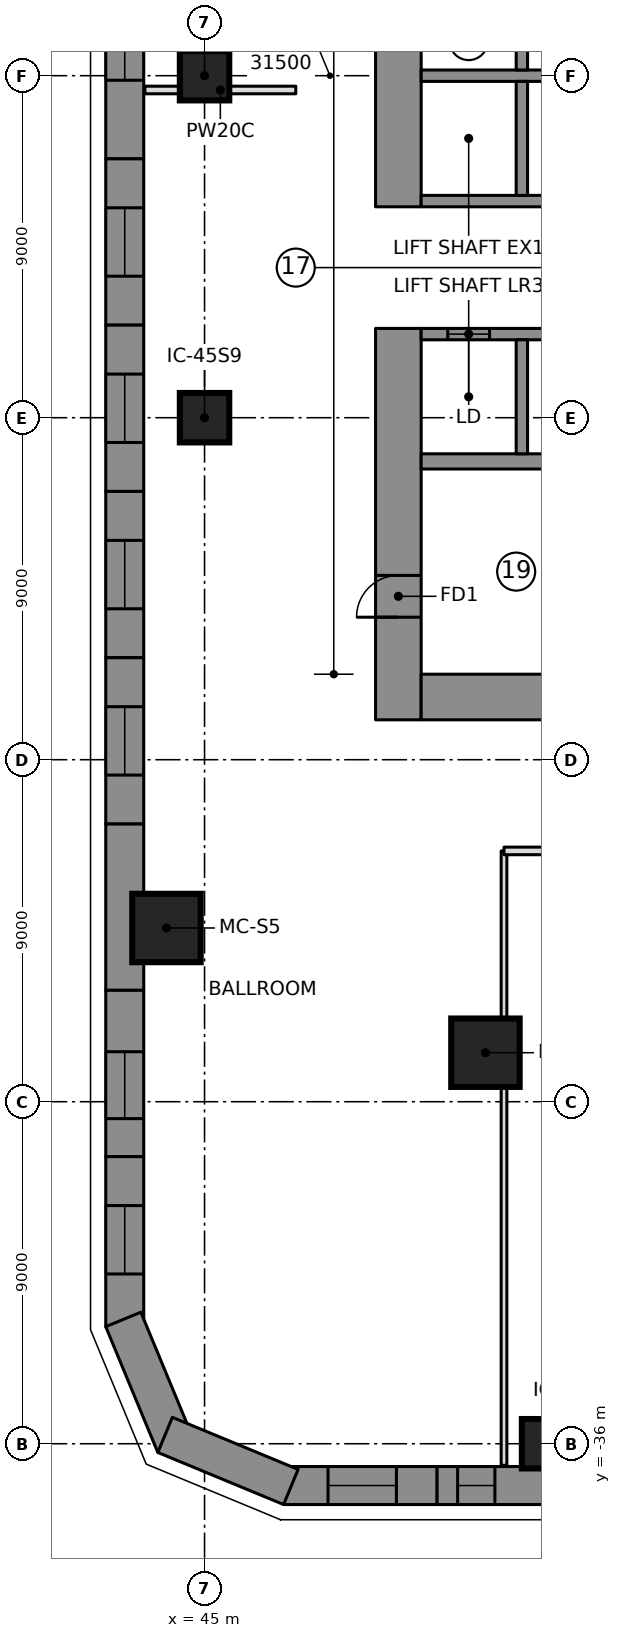
"""IFC4 building model, lengths in metres.
Left out: names, types, materials, properties, quantities, classifications, styles, units other than length and angle.
Written with IfcOpenShell. Run it as: python <this file> out.ifc"""

import sys

from ifc_helpers import new_model, si_unit, direction, frame, frame_2d, origin, origin_2d, place, context, subcontext, project, spatial, polyline, rectangle, outline, extrude, element, fill, save


model = new_model("IFC4")
c1 = context("Model", 3, precision=1e-05, world=origin(), true_north=direction((0.0, 1.0)))
c2 = subcontext(c1, "Body", "Model", "MODEL_VIEW")
j1 = project(units=[si_unit("LENGTHUNIT", "METRE"), si_unit("PLANEANGLEUNIT", "RADIAN")], contexts=[c1])
p1 = place(None, origin())
s1 = spatial("IfcSite", under=j1, at=p1, CompositionType="ELEMENT")
p2 = place(p1, origin())
s2 = spatial("IfcBuilding", under=s1, at=p2, CompositionType="ELEMENT")
p3 = place(p2, frame((0.0, 0.0, 8.0)))
s3 = spatial("IfcBuildingStorey", under=s2, at=p3, CompositionType="ELEMENT", Elevation=8.0)
p4 = place(p3, frame((50.1, -3.45, 0.0), z_axis=(0.0, 0.0, 1.0), x_axis=(0.0, 1.0, 0.0)))
e1 = element("IfcWall", 1, at=p4, inside=s3, PredefinedType="SHEAR", context=c2, shape_type="SweptSolid", body=[
    extrude(rectangle(XDim=6.9, YDim=1.2, at=frame_2d((3.45, 0.0))), origin(), (0.0, 0.0, 1.0), 5.5),
])
p5 = place(p3, frame((50.1, -16.95, 0.0), z_axis=(0.0, 0.0, 1.0), x_axis=(0.0, 1.0, 0.0)))
e2 = element("IfcWall", 2, at=p5, inside=s3, PredefinedType="SHEAR", context=c2, shape_type="SweptSolid", body=[
    extrude(rectangle(XDim=10.3, YDim=1.2, at=frame_2d((5.15, 0.0))), origin(), (0.0, 0.0, 1.0), 5.5),
])
p6 = place(p5, frame((2.7, 0.0, 0.0)))
e3 = element("IfcOpeningElement", 3, at=p6, cuts=e2, PredefinedType="OPENING", context=c2, shape_type="SweptSolid", body=[
    extrude(rectangle(XDim=1.1, YDim=2.1, at=frame_2d((0.55, 1.05))), frame((0.0, 0.61, 0.0), z_axis=(0.0, -1.0, 0.0), x_axis=(1.0, 0.0, 0.0)), (0.0, 0.0, 1.0), 1.22),
])
p7 = place(p3, frame((50.7, -16.35, 0.0), z_axis=(0.0, 0.0, 1.0), x_axis=(1.0, 0.0, 0.0)))
e4 = element("IfcWall", 4, at=p7, inside=s3, PredefinedType="SHEAR", context=c2, shape_type="SweptSolid", body=[
    extrude(rectangle(XDim=13.38, YDim=1.2, at=frame_2d((6.69, 0.0))), origin(), (0.0, 0.0, 1.0), 5.5),
])
p8 = place(p3, frame((50.7, -10.15, 0.0), z_axis=(0.0, 0.0, 1.0), x_axis=(1.0, 0.0, 0.0)))
e5 = element("IfcWall", 5, at=p8, inside=s3, PredefinedType="SHEAR", context=c2, shape_type="SweptSolid", body=[
    extrude(rectangle(XDim=12.18, YDim=0.4, at=frame_2d((6.09, 0.0))), origin(), (0.0, 0.0, 1.0), 5.5),
])
p9 = place(p3, frame((50.7, 0.0, 0.0), z_axis=(0.0, 0.0, 1.0), x_axis=(1.0, 0.0, 0.0)))
e6 = element("IfcWall", 6, at=p9, inside=s3, PredefinedType="SHEAR", context=c2, shape_type="SweptSolid", body=[
    extrude(rectangle(XDim=10.9, YDim=0.3, at=frame_2d((5.45, 0.0))), origin(), (0.0, 0.0, 1.0), 5.5),
])
p10 = place(p3, frame((53.35, 0.15, 0.0), z_axis=(0.0, 0.0, 1.0), x_axis=(0.0, 1.0, 0.0)))
e7 = element("IfcWall", 7, at=p10, inside=s3, PredefinedType="SHEAR", context=c2, shape_type="SweptSolid", body=[
    extrude(rectangle(XDim=3.0, YDim=0.3, at=frame_2d((1.5, 0.0))), origin(), (0.0, 0.0, 1.0), 5.5),
])
p11 = place(p3, frame((50.7, -3.3, 0.0), z_axis=(0.0, 0.0, 1.0), x_axis=(1.0, 0.0, 0.0)))
e8 = element("IfcWall", 8, at=p11, inside=s3, PredefinedType="SHEAR", context=c2, shape_type="SweptSolid", body=[
    extrude(rectangle(XDim=10.9, YDim=0.3, at=frame_2d((5.45, 0.0))), origin(), (0.0, 0.0, 1.0), 5.5),
])
p12 = place(p11, frame((9.2, 0.0, 0.0)))
e9 = element("IfcOpeningElement", 9, at=p12, cuts=e8, PredefinedType="OPENING", context=c2, shape_type="SweptSolid", body=[
    extrude(rectangle(XDim=0.9, YDim=2.1, at=frame_2d((0.45, 1.05))), frame((0.0, 0.16, 0.0), z_axis=(0.0, -1.0, 0.0), x_axis=(1.0, 0.0, 0.0)), (0.0, 0.0, 1.0), 0.32),
])
p13 = place(p3, frame((50.7, -6.8, 0.0), z_axis=(0.0, 0.0, 1.0), x_axis=(1.0, 0.0, 0.0)))
e10 = element("IfcWall", 10, at=p13, inside=s3, PredefinedType="SHEAR", context=c2, shape_type="SweptSolid", body=[
    extrude(rectangle(XDim=10.9, YDim=0.3, at=frame_2d((5.45, 0.0))), origin(), (0.0, 0.0, 1.0), 5.5),
])
p14 = place(p13, frame((0.7, 0.0, 0.0)))
e11 = element("IfcOpeningElement", 11, at=p14, cuts=e10, PredefinedType="OPENING", context=c2, shape_type="SweptSolid", body=[
    extrude(rectangle(XDim=1.1, YDim=2.1, at=frame_2d((0.55, 1.05))), frame((0.0, 0.16, 0.0), z_axis=(0.0, -1.0, 0.0), x_axis=(1.0, 0.0, 0.0)), (0.0, 0.0, 1.0), 0.32),
])
p15 = place(p13, frame((3.5, 0.0, 0.0)))
e12 = element("IfcOpeningElement", 12, at=p15, cuts=e10, PredefinedType="OPENING", context=c2, shape_type="SweptSolid", body=[
    extrude(rectangle(XDim=1.1, YDim=2.1, at=frame_2d((0.55, 1.05))), frame((0.0, 0.16, 0.0), z_axis=(0.0, -1.0, 0.0), x_axis=(1.0, 0.0, 0.0)), (0.0, 0.0, 1.0), 0.32),
])
p16 = place(p13, frame((6.3, 0.0, 0.0)))
e13 = element("IfcOpeningElement", 13, at=p16, cuts=e10, PredefinedType="OPENING", context=c2, shape_type="SweptSolid", body=[
    extrude(rectangle(XDim=1.1, YDim=2.1, at=frame_2d((0.55, 1.05))), frame((0.0, 0.16, 0.0), z_axis=(0.0, -1.0, 0.0), x_axis=(1.0, 0.0, 0.0)), (0.0, 0.0, 1.0), 0.32),
])
p17 = place(p13, frame((9.1, 0.0, 0.0)))
e14 = element("IfcOpeningElement", 14, at=p17, cuts=e10, PredefinedType="OPENING", context=c2, shape_type="SweptSolid", body=[
    extrude(rectangle(XDim=1.1, YDim=2.1, at=frame_2d((0.55, 1.05))), frame((0.0, 0.16, 0.0), z_axis=(0.0, -1.0, 0.0), x_axis=(1.0, 0.0, 0.0)), (0.0, 0.0, 1.0), 0.32),
])
for number, where, z_axis, x_axis in (
    (15, (53.35, -3.15, 0.0), (0.0, 0.0, 1.0), (0.0, 1.0, 0.0)),
    (16, (53.35, -9.95, 0.0), (0.0, 0.0, 1.0), (0.0, 1.0, 0.0)),
):
    element("IfcWall", number, at=place(p3, frame(where, z_axis=z_axis, x_axis=x_axis)), inside=s3, PredefinedType="SHEAR", context=c2, shape_type="SweptSolid", body=[
        extrude(rectangle(XDim=3.0, YDim=0.3, at=frame_2d((1.5, 0.0))), origin(), (0.0, 0.0, 1.0), 5.5),
    ])
for number, where, z_axis, x_axis in (
    (17, (43.998, -22.428, 0.0), (0.0, 0.0, 1.0), (1.0, 0.0, 0.0)),
    (18, (52.392, -25.71, 0.0), (0.0, 0.0, 1.0), (1.0, 0.0, 0.0)),
):
    element("IfcColumn", number, at=place(p3, frame(where, z_axis=z_axis, x_axis=x_axis)), inside=s3, PredefinedType="COLUMN", context=c2, shape_type="SweptSolid", body=[
        extrude(rectangle(XDim=1.8, YDim=1.8, at=origin_2d()), origin(), (0.0, 0.0, 1.0), 5.5),
    ])
for number, where, z_axis, x_axis in (
    (19, (45.0, -9.0, 0.0), (0.0, 0.0, 1.0), (1.0, 0.0, 0.0)),
    (20, (45.0, 0.0, 0.0), (0.0, 0.0, 1.0), (1.0, 0.0, 0.0)),
    (21, (54.0, -36.0, 0.0), (0.0, 0.0, 1.0), (1.0, 0.0, 0.0)),
):
    element("IfcColumn", number, at=place(p3, frame(where, z_axis=z_axis, x_axis=x_axis)), inside=s3, PredefinedType="COLUMN", context=c2, shape_type="SweptSolid", body=[
        extrude(rectangle(XDim=1.3, YDim=1.3, at=origin_2d()), origin(), (0.0, 0.0, 1.0), 5.5),
    ])
p18 = place(p3, frame((47.179, -37.1, 0.0), z_axis=(0.0, 0.0, 1.0), x_axis=(1.0, 0.0, 0.0)))
e22 = element("IfcWall", 22, at=p18, inside=s3, PredefinedType="NOTDEFINED", context=c2, shape_type="SweptSolid", body=[
    extrude(outline(polyline([(-0.1, -0.5), (3.94, -0.5), (3.94, 0.5), (0.1, 0.5), (-0.1, -0.5)])), origin(), (0.0, 0.0, 1.0), 5.2),
])
p19 = place(p18, frame((1.07, 0.0, 0.9)))
e23 = element("IfcOpeningElement", 23, at=p19, cuts=e22, PredefinedType="OPENING", context=c2, shape_type="SweptSolid", body=[
    extrude(rectangle(XDim=1.8, YDim=2.4, at=frame_2d((0.9, 1.2))), frame((0.0, 0.51, 0.0), z_axis=(0.0, -1.0, 0.0), x_axis=(1.0, 0.0, 0.0)), (0.0, 0.0, 1.0), 1.02),
])
p20 = place(p3, frame((51.119, -37.1, 0.0), z_axis=(0.0, 0.0, 1.0), x_axis=(1.0, 0.0, 0.0)))
e24 = element("IfcWall", 24, at=p20, inside=s3, PredefinedType="NOTDEFINED", context=c2, shape_type="SweptSolid", body=[
    extrude(outline(polyline([(0.0, -0.5), (3.94, -0.5), (3.94, 0.5), (0.0, 0.5), (0.0, -0.5)])), origin(), (0.0, 0.0, 1.0), 5.2),
])
p21 = place(p20, frame((0.54, 0.0, 0.9)))
e25 = element("IfcOpeningElement", 25, at=p21, cuts=e24, PredefinedType="OPENING", context=c2, shape_type="SweptSolid", body=[
    extrude(rectangle(XDim=0.981, YDim=2.4, at=frame_2d((0.49, 1.2))), frame((0.0, 0.51, 0.0), z_axis=(0.0, -1.0, 0.0), x_axis=(1.0, 0.0, 0.0)), (0.0, 0.0, 1.0), 1.02),
])
p22 = place(p3, frame((42.9, 2.188, 0.0), z_axis=(0.0, 0.0, 1.0), x_axis=(0.0, -1.0, 0.0)))
e26 = element("IfcWall", 26, at=p22, inside=s3, PredefinedType="NOTDEFINED", context=c2, shape_type="SweptSolid", body=[
    extrude(outline(polyline([(0.0, -0.5), (4.376, -0.5), (4.376, 0.5), (0.0, 0.5), (0.0, -0.5)])), origin(), (0.0, 0.0, 1.0), 5.2),
])
p23 = place(p22, frame((0.508, 0.0, 0.9)))
e27 = element("IfcOpeningElement", 27, at=p23, cuts=e26, PredefinedType="OPENING", context=c2, shape_type="SweptSolid", body=[
    extrude(rectangle(XDim=1.8, YDim=2.4, at=frame_2d((0.9, 1.2))), frame((0.0, 0.51, 0.0), z_axis=(0.0, -1.0, 0.0), x_axis=(1.0, 0.0, 0.0)), (0.0, 0.0, 1.0), 1.02),
])
p24 = place(p3, frame((42.9, -2.188, 0.0), z_axis=(0.0, 0.0, 1.0), x_axis=(0.0, -1.0, 0.0)))
e28 = element("IfcWall", 28, at=p24, inside=s3, PredefinedType="NOTDEFINED", context=c2, shape_type="SweptSolid", body=[
    extrude(outline(polyline([(0.0, -0.5), (4.376, -0.5), (4.376, 0.5), (0.0, 0.5), (0.0, -0.5)])), origin(), (0.0, 0.0, 1.0), 5.2),
])
p25 = place(p24, frame((1.288, 0.0, 0.9)))
e29 = element("IfcOpeningElement", 29, at=p25, cuts=e28, PredefinedType="OPENING", context=c2, shape_type="SweptSolid", body=[
    extrude(rectangle(XDim=1.8, YDim=2.4, at=frame_2d((0.9, 1.2))), frame((0.0, 0.51, 0.0), z_axis=(0.0, -1.0, 0.0), x_axis=(1.0, 0.0, 0.0)), (0.0, 0.0, 1.0), 1.02),
])
p26 = place(p3, frame((42.9, -6.564, 0.0), z_axis=(0.0, 0.0, 1.0), x_axis=(0.0, -1.0, 0.0)))
e30 = element("IfcWall", 30, at=p26, inside=s3, PredefinedType="NOTDEFINED", context=c2, shape_type="SweptSolid", body=[
    extrude(outline(polyline([(0.0, -0.5), (4.376, -0.5), (4.376, 0.5), (0.0, 0.5), (0.0, -0.5)])), origin(), (0.0, 0.0, 1.0), 5.2),
])
p27 = place(p26, frame((1.288, 0.0, 0.9)))
e31 = element("IfcOpeningElement", 31, at=p27, cuts=e30, PredefinedType="OPENING", context=c2, shape_type="SweptSolid", body=[
    extrude(rectangle(XDim=1.8, YDim=2.4, at=frame_2d((0.9, 1.2))), frame((0.0, 0.51, 0.0), z_axis=(0.0, -1.0, 0.0), x_axis=(1.0, 0.0, 0.0)), (0.0, 0.0, 1.0), 1.02),
])
p28 = place(p3, frame((42.9, -10.94, 0.0), z_axis=(0.0, 0.0, 1.0), x_axis=(0.0, -1.0, 0.0)))
e32 = element("IfcWall", 32, at=p28, inside=s3, PredefinedType="NOTDEFINED", context=c2, shape_type="SweptSolid", body=[
    extrude(outline(polyline([(0.0, -0.5), (4.376, -0.5), (4.376, 0.5), (0.0, 0.5), (0.0, -0.5)])), origin(), (0.0, 0.0, 1.0), 5.2),
])
p29 = place(p28, frame((1.288, 0.0, 0.9)))
e33 = element("IfcOpeningElement", 33, at=p29, cuts=e32, PredefinedType="OPENING", context=c2, shape_type="SweptSolid", body=[
    extrude(rectangle(XDim=1.8, YDim=2.4, at=frame_2d((0.9, 1.2))), frame((0.0, 0.51, 0.0), z_axis=(0.0, -1.0, 0.0), x_axis=(1.0, 0.0, 0.0)), (0.0, 0.0, 1.0), 1.02),
])
p30 = place(p3, frame((42.9, -15.316, 0.0), z_axis=(0.0, 0.0, 1.0), x_axis=(0.0, -1.0, 0.0)))
e34 = element("IfcWall", 34, at=p30, inside=s3, PredefinedType="NOTDEFINED", context=c2, shape_type="SweptSolid", body=[
    extrude(outline(polyline([(0.0, -0.5), (4.376, -0.5), (4.376, 0.5), (0.0, 0.5), (0.0, -0.5)])), origin(), (0.0, 0.0, 1.0), 5.2),
])
p31 = place(p30, frame((1.288, 0.0, 0.9)))
e35 = element("IfcOpeningElement", 35, at=p31, cuts=e34, PredefinedType="OPENING", context=c2, shape_type="SweptSolid", body=[
    extrude(rectangle(XDim=1.8, YDim=2.4, at=frame_2d((0.9, 1.2))), frame((0.0, 0.51, 0.0), z_axis=(0.0, -1.0, 0.0), x_axis=(1.0, 0.0, 0.0)), (0.0, 0.0, 1.0), 1.02),
])
p32 = place(p3, frame((42.9, -19.693, 0.0), z_axis=(0.0, 0.0, 1.0), x_axis=(0.0, -1.0, 0.0)))
e36 = element("IfcWall", 36, at=p32, inside=s3, PredefinedType="NOTDEFINED", context=c2, shape_type="SweptSolid", body=[
    extrude(outline(polyline([(0.0, -0.5), (4.376, -0.5), (4.376, 0.5), (0.0, 0.5), (0.0, -0.5)])), origin(), (0.0, 0.0, 1.0), 5.2),
])
p33 = place(p3, frame((42.9, -24.069, 0.0), z_axis=(0.0, 0.0, 1.0), x_axis=(0.0, -1.0, 0.0)))
e37 = element("IfcWall", 37, at=p33, inside=s3, PredefinedType="NOTDEFINED", context=c2, shape_type="SweptSolid", body=[
    extrude(outline(polyline([(0.0, -0.5), (4.376, -0.5), (4.376, 0.5), (0.0, 0.5), (0.0, -0.5)])), origin(), (0.0, 0.0, 1.0), 5.2),
])
p34 = place(p33, frame((1.615, 0.0, 0.9)))
e38 = element("IfcOpeningElement", 38, at=p34, cuts=e37, PredefinedType="OPENING", context=c2, shape_type="SweptSolid", body=[
    extrude(rectangle(XDim=1.76, YDim=2.4, at=frame_2d((0.88, 1.2))), frame((0.0, 0.51, 0.0), z_axis=(0.0, -1.0, 0.0), x_axis=(1.0, 0.0, 0.0)), (0.0, 0.0, 1.0), 1.02),
])
p35 = place(p3, frame((42.9, -28.445, 0.0), z_axis=(0.0, 0.0, 1.0), x_axis=(0.0, -1.0, 0.0)))
e39 = element("IfcWall", 39, at=p35, inside=s3, PredefinedType="NOTDEFINED", context=c2, shape_type="SweptSolid", body=[
    extrude(outline(polyline([(0.0, -0.5), (4.476, -0.5), (4.277, 0.5), (0.0, 0.5), (0.0, -0.5)])), origin(), (0.0, 0.0, 1.0), 5.2),
])
p36 = place(p35, frame((1.288, 0.0, 0.9)))
e40 = element("IfcOpeningElement", 40, at=p36, cuts=e39, PredefinedType="OPENING", context=c2, shape_type="SweptSolid", body=[
    extrude(rectangle(XDim=1.8, YDim=2.4, at=frame_2d((0.9, 1.2))), frame((0.0, 0.51, 0.0), z_axis=(0.0, -1.0, 0.0), x_axis=(1.0, 0.0, 0.0)), (0.0, 0.0, 1.0), 1.02),
])
p37 = place(p3, frame((42.9, -32.821, 0.0), z_axis=(0.0, 0.0, 1.0), x_axis=(0.382724875529, -0.923862365102, 0.0)))
e41 = element("IfcWall", 41, at=p37, inside=s3, PredefinedType="NOTDEFINED", context=c2, shape_type="SweptSolid", body=[
    extrude(outline(polyline([(-0.1, -0.5), (3.482, -0.5), (3.068, 0.5), (0.1, 0.5), (-0.1, -0.5)])), origin(), (0.0, 0.0, 1.0), 5.2),
])
p38 = place(p3, frame((44.153, -35.847, 0.0), z_axis=(0.0, 0.0, 1.0), x_axis=(0.923862365102, -0.382724875529, 0.0)))
e42 = element("IfcWall", 42, at=p38, inside=s3, PredefinedType="NOTDEFINED", context=c2, shape_type="SweptSolid", body=[
    extrude(outline(polyline([(-0.207, -0.5), (3.375, -0.5), (3.175, 0.5), (0.207, 0.5), (-0.207, -0.5)])), origin(), (0.0, 0.0, 1.0), 5.2),
])
p39 = place(p3, frame((43.43, -0.376, 0.0), z_axis=(0.0, 0.0, 1.0), x_axis=(1.0, 0.0, 0.0)))
e43 = element("IfcWall", 43, at=p39, inside=s3, PredefinedType="PARTITIONING", context=c2, shape_type="SweptSolid", body=[
    extrude(rectangle(XDim=3.971, YDim=0.2, at=frame_2d((1.985, 0.0))), origin(), (0.0, 0.0, 1.0), 5.15),
])
p40 = place(p3, frame((52.88, -36.57, 0.0), z_axis=(0.0, 0.0, 1.0), x_axis=(0.0, 1.0, 0.0)))
e44 = element("IfcWall", 44, at=p40, inside=s3, PredefinedType="PARTITIONING", context=c2, shape_type="SweptSolid", body=[
    extrude(rectangle(XDim=16.17, YDim=0.15, at=frame_2d((8.085, 0.0))), origin(), (0.0, 0.0, 1.0), 5.15),
])
p41 = place(p3, frame((52.88, -20.4, 0.0), z_axis=(0.0, 0.0, 1.0), x_axis=(1.0, 0.0, 0.0)))
e45 = element("IfcWall", 45, at=p41, inside=s3, PredefinedType="PARTITIONING", context=c2, shape_type="SweptSolid", body=[
    extrude(rectangle(XDim=5.78, YDim=0.2, at=frame_2d((2.89, 0.0))), origin(), (0.0, 0.0, 1.0), 5.15),
])
p42 = place(p41, frame((2.39, 0.0, 0.0)))
e46 = element("IfcOpeningElement", 46, at=p42, cuts=e45, PredefinedType="OPENING", context=c2, shape_type="SweptSolid", body=[
    extrude(rectangle(XDim=2.0, YDim=2.4, at=frame_2d((1.0, 1.2))), frame((0.0, 0.11, 0.0), z_axis=(0.0, -1.0, 0.0), x_axis=(1.0, 0.0, 0.0)), (0.0, 0.0, 1.0), 0.22),
])
p43 = place(p19, origin())
e47 = element("IfcWindow", 47, at=p43, inside=s3, PartitioningType="SINGLE_PANEL", PredefinedType="WINDOW", context=c2, shape_type="SweptSolid", body=[
    extrude(rectangle(XDim=1.8, YDim=2.4, at=frame_2d((0.9, 1.2))), frame((0.0, 0.5, 0.0), z_axis=(0.0, -1.0, 0.0), x_axis=(1.0, 0.0, 0.0)), (0.0, 0.0, 1.0), 0.06),
])
fill(e23, e47)
p44 = place(p21, origin())
e48 = element("IfcWindow", 48, at=p44, inside=s3, PartitioningType="SINGLE_PANEL", PredefinedType="WINDOW", context=c2, shape_type="SweptSolid", body=[
    extrude(rectangle(XDim=0.981, YDim=2.4, at=frame_2d((0.49, 1.2))), frame((0.0, 0.5, 0.0), z_axis=(0.0, -1.0, 0.0), x_axis=(1.0, 0.0, 0.0)), (0.0, 0.0, 1.0), 0.06),
])
fill(e25, e48)
p45 = place(p23, origin())
e49 = element("IfcWindow", 49, at=p45, inside=s3, PartitioningType="SINGLE_PANEL", PredefinedType="WINDOW", context=c2, shape_type="SweptSolid", body=[
    extrude(rectangle(XDim=1.8, YDim=2.4, at=frame_2d((0.9, 1.2))), frame((0.0, 0.5, 0.0), z_axis=(0.0, -1.0, 0.0), x_axis=(1.0, 0.0, 0.0)), (0.0, 0.0, 1.0), 0.06),
])
fill(e27, e49)
p46 = place(p25, origin())
e50 = element("IfcWindow", 50, at=p46, inside=s3, PartitioningType="SINGLE_PANEL", PredefinedType="WINDOW", context=c2, shape_type="SweptSolid", body=[
    extrude(rectangle(XDim=1.8, YDim=2.4, at=frame_2d((0.9, 1.2))), frame((0.0, 0.5, 0.0), z_axis=(0.0, -1.0, 0.0), x_axis=(1.0, 0.0, 0.0)), (0.0, 0.0, 1.0), 0.06),
])
fill(e29, e50)
p47 = place(p27, origin())
e51 = element("IfcWindow", 51, at=p47, inside=s3, PartitioningType="SINGLE_PANEL", PredefinedType="WINDOW", context=c2, shape_type="SweptSolid", body=[
    extrude(rectangle(XDim=1.8, YDim=2.4, at=frame_2d((0.9, 1.2))), frame((0.0, 0.5, 0.0), z_axis=(0.0, -1.0, 0.0), x_axis=(1.0, 0.0, 0.0)), (0.0, 0.0, 1.0), 0.06),
])
fill(e31, e51)
p48 = place(p29, origin())
e52 = element("IfcWindow", 52, at=p48, inside=s3, PartitioningType="SINGLE_PANEL", PredefinedType="WINDOW", context=c2, shape_type="SweptSolid", body=[
    extrude(rectangle(XDim=1.8, YDim=2.4, at=frame_2d((0.9, 1.2))), frame((0.0, 0.5, 0.0), z_axis=(0.0, -1.0, 0.0), x_axis=(1.0, 0.0, 0.0)), (0.0, 0.0, 1.0), 0.06),
])
fill(e33, e52)
p49 = place(p31, origin())
e53 = element("IfcWindow", 53, at=p49, inside=s3, PartitioningType="SINGLE_PANEL", PredefinedType="WINDOW", context=c2, shape_type="SweptSolid", body=[
    extrude(rectangle(XDim=1.8, YDim=2.4, at=frame_2d((0.9, 1.2))), frame((0.0, 0.5, 0.0), z_axis=(0.0, -1.0, 0.0), x_axis=(1.0, 0.0, 0.0)), (0.0, 0.0, 1.0), 0.06),
])
fill(e35, e53)
p50 = place(p34, origin())
e54 = element("IfcWindow", 54, at=p50, inside=s3, PartitioningType="SINGLE_PANEL", PredefinedType="WINDOW", context=c2, shape_type="SweptSolid", body=[
    extrude(rectangle(XDim=1.76, YDim=2.4, at=frame_2d((0.88, 1.2))), frame((0.0, 0.5, 0.0), z_axis=(0.0, -1.0, 0.0), x_axis=(1.0, 0.0, 0.0)), (0.0, 0.0, 1.0), 0.06),
])
fill(e38, e54)
p51 = place(p36, origin())
e55 = element("IfcWindow", 55, at=p51, inside=s3, PartitioningType="SINGLE_PANEL", PredefinedType="WINDOW", context=c2, shape_type="SweptSolid", body=[
    extrude(rectangle(XDim=1.8, YDim=2.4, at=frame_2d((0.9, 1.2))), frame((0.0, 0.5, 0.0), z_axis=(0.0, -1.0, 0.0), x_axis=(1.0, 0.0, 0.0)), (0.0, 0.0, 1.0), 0.06),
])
fill(e40, e55)
p52 = place(p14, origin())
e56 = element("IfcDoor", 56, at=p52, inside=s3, OperationType="DOUBLE_DOOR_SLIDING", PredefinedType="DOOR", context=c2, shape_type="SweptSolid", body=[
    extrude(rectangle(XDim=1.1, YDim=2.1, at=frame_2d((0.55, 1.05))), frame((0.0, 0.025, 0.0), z_axis=(0.0, -1.0, 0.0), x_axis=(1.0, 0.0, 0.0)), (0.0, 0.0, 1.0), 0.05),
])
fill(e11, e56)
p53 = place(p6, origin())
e57 = element("IfcDoor", 57, at=p53, inside=s3, OperationType="SINGLE_SWING_RIGHT", PredefinedType="DOOR", context=c2, shape_type="SweptSolid", body=[
    extrude(rectangle(XDim=1.1, YDim=2.1, at=frame_2d((0.55, 1.05))), frame((0.0, 0.025, 0.0), z_axis=(0.0, -1.0, 0.0), x_axis=(1.0, 0.0, 0.0)), (0.0, 0.0, 1.0), 0.05),
])
fill(e3, e57)
save(model, sys.argv[1])
